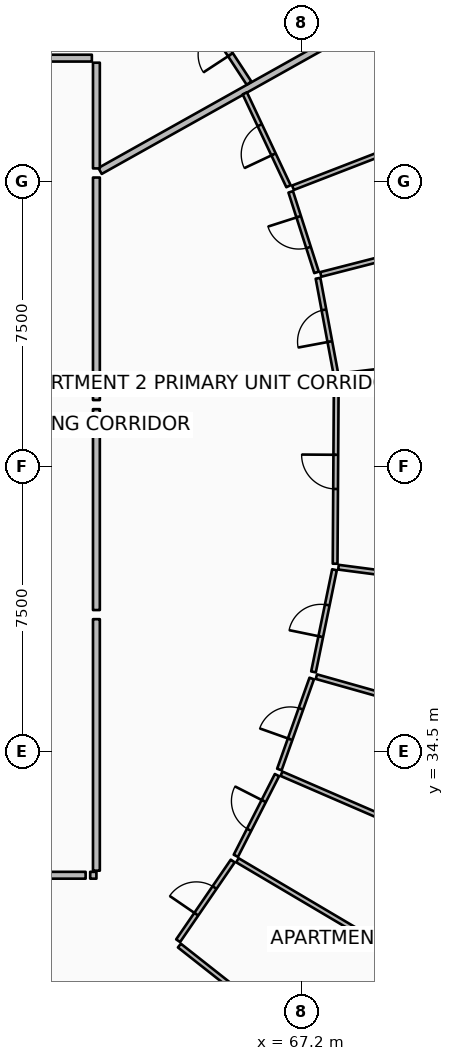
"""IFC4 building model, lengths in metres.
Left out: names, types, materials, properties, quantities, classifications, styles, units other than length and angle.
Written with IfcOpenShell. Run it as: python <this file> out.ifc"""

import sys

from ifc_helpers import new_model, si_unit, direction, frame, frame_2d, origin, place, context, subcontext, project, spatial, rectangle, extrude, element, fill, save


model = new_model("IFC4")
c1 = context("Model", 3, precision=1e-05, world=origin(), true_north=direction((0.0, 1.0)))
c2 = subcontext(c1, "Body", "Model", "MODEL_VIEW")
j1 = project(units=[si_unit("LENGTHUNIT", "METRE"), si_unit("PLANEANGLEUNIT", "RADIAN")], contexts=[c1])
p1 = place(None, origin())
s1 = spatial("IfcSite", under=j1, at=p1, CompositionType="ELEMENT")
p2 = place(p1, origin())
s2 = spatial("IfcBuilding", under=s1, at=p2, CompositionType="ELEMENT")
p3 = place(p2, frame((0.0, 0.0, 30.15)))
s3 = spatial("IfcBuildingStorey", under=s2, at=p3, CompositionType="ELEMENT", Elevation=30.15)
p4 = place(p3, frame((61.896, 49.782, 0.0), z_axis=(0.0, 0.0, 1.0), x_axis=(0.872493215695, 0.488626225828, 0.0)))
e1 = element("IfcWall", 1, at=p4, inside=s3, PredefinedType="PARTITIONING", context=c2, shape_type="SweptSolid", body=[
    extrude(rectangle(XDim=15.612, YDim=0.18, at=frame_2d((7.806, 0.0))), origin(), (0.0, 0.0, 1.0), 2.867),
])
p5 = place(p3, frame((61.8, 49.848, 0.0), z_axis=(0.0, 0.0, 1.0), x_axis=(0.0, 1.0, 0.0)))
e2 = element("IfcWall", 2, at=p5, inside=s3, PredefinedType="PARTITIONING", context=c2, shape_type="SweptSolid", body=[
    extrude(rectangle(XDim=2.781, YDim=0.18, at=frame_2d((1.391, 0.0))), origin(), (0.0, 0.0, 1.0), 2.867),
])
p6 = place(p3, frame((61.68, 52.75, 0.0), z_axis=(0.0, 0.0, 1.0), x_axis=(-1.0, 0.0, 0.0)))
e3 = element("IfcWall", 3, at=p6, inside=s3, PredefinedType="PARTITIONING", context=c2, shape_type="SweptSolid", body=[
    extrude(rectangle(XDim=5.085, YDim=0.18, at=frame_2d((2.543, 0.0))), origin(), (0.0, 0.0, 1.0), 2.867),
])
p7 = place(p3, frame((65.816, 52.092, 0.0), z_axis=(0.0, 0.0, 1.0), x_axis=(-0.547635625156, 0.836716930664, 0.0)))
e4 = element("IfcWall", 4, at=p7, inside=s3, PredefinedType="PARTITIONING", context=c2, shape_type="SweptSolid", body=[
    extrude(rectangle(XDim=2.639, YDim=0.15, at=frame_2d((1.32, 0.0))), origin(), (0.0, 0.0, 1.0), 2.867),
])
p8 = place(p7, frame((0.895, 0.0, 0.0)))
e5 = element("IfcOpeningElement", 5, at=p8, cuts=e4, PredefinedType="OPENING", context=c2, shape_type="SweptSolid", body=[
    extrude(rectangle(XDim=0.85, YDim=2.06, at=frame_2d((0.425, 1.03))), frame((0.0, 0.085, 0.0), z_axis=(0.0, -1.0, 0.0), x_axis=(1.0, 0.0, 0.0)), (0.0, 0.0, 1.0), 0.17),
])
p9 = place(p3, frame((54.14, 31.25, 0.0), z_axis=(0.0, 0.0, 1.0), x_axis=(1.0, 0.0, 0.0)))
e6 = element("IfcWall", 6, at=p9, inside=s3, PredefinedType="PARTITIONING", context=c2, shape_type="SweptSolid", body=[
    extrude(rectangle(XDim=7.376, YDim=0.18, at=frame_2d((3.688, 0.0))), origin(), (0.0, 0.0, 1.0), 2.867),
])
p10 = place(p9, frame((3.138, 0.0, 0.0)))
e7 = element("IfcOpeningElement", 7, at=p10, cuts=e6, PredefinedType="OPENING", context=c2, shape_type="SweptSolid", body=[
    extrude(rectangle(XDim=1.1, YDim=2.1, at=frame_2d((0.55, 1.05))), frame((0.0, 0.1, 0.0), z_axis=(0.0, -1.0, 0.0), x_axis=(1.0, 0.0, 0.0)), (0.0, 0.0, 1.0), 0.2),
])
p11 = place(p3, frame((61.636, 31.25, 0.0), z_axis=(0.0, 0.0, 1.0), x_axis=(1.0, 0.0, 0.0)))
e8 = element("IfcWall", 8, at=p11, inside=s3, PredefinedType="PARTITIONING", context=c2, shape_type="SweptSolid", body=[
    extrude(rectangle(XDim=0.164, YDim=0.18, at=frame_2d((0.082, 0.0))), origin(), (0.0, 0.0, 1.0), 2.867),
])
p12 = place(p3, frame((61.8, 31.37, 0.0), z_axis=(0.0, 0.0, 1.0), x_axis=(0.0, 1.0, 0.0)))
e9 = element("IfcWall", 9, at=p12, inside=s3, PredefinedType="PARTITIONING", context=c2, shape_type="SweptSolid", body=[
    extrude(rectangle(XDim=6.618, YDim=0.18, at=frame_2d((3.309, 0.0))), origin(), (0.0, 0.0, 1.0), 2.867),
])
p13 = place(p3, frame((63.983, 29.4, 0.0), z_axis=(0.0, 0.0, 1.0), x_axis=(0.785322984339, -0.619086270457, 0.0)))
e10 = element("IfcWall", 10, at=p13, inside=s3, PredefinedType="PARTITIONING", context=c2, shape_type="SweptSolid", body=[
    extrude(rectangle(XDim=7.719, YDim=0.125, at=frame_2d((3.86, 0.0))), origin(), (0.0, 0.0, 1.0), 2.867),
])
p14 = place(p3, frame((65.51, 31.645, 0.0), z_axis=(0.0, 0.0, 1.0), x_axis=(0.86074163886, -0.509042072065, 0.0)))
e11 = element("IfcWall", 11, at=p14, inside=s3, PredefinedType="PARTITIONING", context=c2, shape_type="SweptSolid", body=[
    extrude(rectangle(XDim=7.968, YDim=0.125, at=frame_2d((3.984, 0.0))), origin(), (0.0, 0.0, 1.0), 2.94),
])
p15 = place(p3, frame((66.67, 33.921, 0.0), z_axis=(0.0, 0.0, 1.0), x_axis=(0.917747697885, -0.397163899451, 0.0)))
e12 = element("IfcWall", 12, at=p15, inside=s3, PredefinedType="PARTITIONING", context=c2, shape_type="SweptSolid", body=[
    extrude(rectangle(XDim=8.775, YDim=0.125, at=frame_2d((4.387, 0.0))), origin(), (0.0, 0.0, 1.0), 2.94),
])
p16 = place(p3, frame((63.95, 29.528, 0.0), z_axis=(0.0, 0.0, 1.0), x_axis=(0.565358509176, 0.824845292223, 0.0)))
e13 = element("IfcWall", 13, at=p16, inside=s3, PredefinedType="PARTITIONING", context=c2, shape_type="SweptSolid", body=[
    extrude(rectangle(XDim=2.542, YDim=0.125, at=frame_2d((1.271, 0.0))), origin(), (0.0, 0.0, 1.0), 2.867),
])
p17 = place(p16, frame((0.846, 0.0, 0.0)))
e14 = element("IfcOpeningElement", 14, at=p17, cuts=e13, PredefinedType="OPENING", context=c2, shape_type="SweptSolid", body=[
    extrude(rectangle(XDim=0.85, YDim=2.06, at=frame_2d((0.425, 1.03))), frame((0.0, 0.073, 0.0), z_axis=(0.0, -1.0, 0.0), x_axis=(1.0, 0.0, 0.0)), (0.0, 0.0, 1.0), 0.145),
])
p18 = place(p3, frame((65.469, 31.762, 0.0), z_axis=(0.0, 0.0, 1.0), x_axis=(0.45400250644, 0.891000406367, 0.0)))
e15 = element("IfcWall", 15, at=p18, inside=s3, PredefinedType="PARTITIONING", context=c2, shape_type="SweptSolid", body=[
    extrude(rectangle(XDim=2.383, YDim=0.125, at=frame_2d((1.192, 0.0))), origin(), (0.0, 0.0, 1.0), 2.94),
])
p19 = place(p18, frame((0.767, 0.0, 0.0)))
e16 = element("IfcOpeningElement", 16, at=p19, cuts=e15, PredefinedType="OPENING", context=c2, shape_type="SweptSolid", body=[
    extrude(rectangle(XDim=0.85, YDim=2.06, at=frame_2d((0.425, 1.03))), frame((0.0, 0.073, 0.0), z_axis=(0.0, -1.0, 0.0), x_axis=(1.0, 0.0, 0.0)), (0.0, 0.0, 1.0), 0.145),
])
p20 = place(p3, frame((66.614, 34.032, 0.0), z_axis=(0.0, 0.0, 1.0), x_axis=(0.335094930465, 0.942184370268, 0.0)))
e17 = element("IfcWall", 17, at=p20, inside=s3, PredefinedType="PARTITIONING", context=c2, shape_type="SweptSolid", body=[
    extrude(rectangle(XDim=2.542, YDim=0.125, at=frame_2d((1.271, 0.0))), origin(), (0.0, 0.0, 1.0), 2.867),
])
p21 = place(p20, frame((0.846, 0.0, 0.0)))
e18 = element("IfcOpeningElement", 18, at=p21, cuts=e17, PredefinedType="OPENING", context=c2, shape_type="SweptSolid", body=[
    extrude(rectangle(XDim=0.85, YDim=2.06, at=frame_2d((0.425, 1.03))), frame((0.0, 0.073, 0.0), z_axis=(0.0, -1.0, 0.0), x_axis=(1.0, 0.0, 0.0)), (0.0, 0.0, 1.0), 0.145),
])
p22 = place(p3, frame((61.8, 38.228, 0.0), z_axis=(0.0, 0.0, 1.0), x_axis=(0.0, 1.0, 0.0)))
e19 = element("IfcWall", 19, at=p22, inside=s3, PredefinedType="PARTITIONING", context=c2, shape_type="SweptSolid", body=[
    extrude(rectangle(XDim=5.285, YDim=0.18, at=frame_2d((2.643, 0.0))), origin(), (0.0, 0.0, 1.0), 2.867),
])
p23 = place(p3, frame((67.589, 36.475, 0.0), z_axis=(0.0, 0.0, 1.0), x_axis=(0.962457516126, -0.271432366627, 0.0)))
e20 = element("IfcWall", 20, at=p23, inside=s3, PredefinedType="PARTITIONING", context=c2, shape_type="SweptSolid", body=[
    extrude(rectangle(XDim=10.221, YDim=0.125, at=frame_2d((5.111, 0.0))), origin(), (0.0, 0.0, 1.0), 2.867),
])
p24 = place(p3, frame((68.17, 39.355, 0.0), z_axis=(0.0, 0.0, 1.0), x_axis=(0.991512615626, -0.130010511326, 0.0)))
e21 = element("IfcWall", 21, at=p24, inside=s3, PredefinedType="PARTITIONING", context=c2, shape_type="SweptSolid", body=[
    extrude(rectangle(XDim=10.369, YDim=0.125, at=frame_2d((5.185, 0.0))), origin(), (0.0, 0.0, 1.0), 2.94),
])
p25 = place(p3, frame((67.513, 36.601, 0.0), z_axis=(0.0, 0.0, 1.0), x_axis=(0.201246233374, 0.979540684991, 0.0)))
e22 = element("IfcWall", 22, at=p25, inside=s3, PredefinedType="PARTITIONING", context=c2, shape_type="SweptSolid", body=[
    extrude(rectangle(XDim=2.744, YDim=0.125, at=frame_2d((1.372, 0.0))), origin(), (0.0, 0.0, 1.0), 2.867),
])
p26 = place(p25, frame((0.947, 0.0, 0.0)))
e23 = element("IfcOpeningElement", 23, at=p26, cuts=e22, PredefinedType="OPENING", context=c2, shape_type="SweptSolid", body=[
    extrude(rectangle(XDim=0.85, YDim=2.06, at=frame_2d((0.425, 1.03))), frame((0.0, 0.073, 0.0), z_axis=(0.0, -1.0, 0.0), x_axis=(1.0, 0.0, 0.0)), (0.0, 0.0, 1.0), 0.145),
])
p27 = place(p3, frame((68.082, 39.447, 0.0), z_axis=(0.0, 0.0, 1.0), x_axis=(0.006313643226, 0.999980068756, 0.0)))
e24 = element("IfcWall", 24, at=p27, inside=s3, PredefinedType="PARTITIONING", context=c2, shape_type="SweptSolid", body=[
    extrude(rectangle(XDim=4.833, YDim=0.125, at=frame_2d((2.417, 0.0))), origin(), (0.0, 0.0, 1.0), 2.867),
])
p28 = place(p27, frame((1.967, 0.0, 0.0)))
e25 = element("IfcOpeningElement", 25, at=p28, cuts=e24, PredefinedType="OPENING", context=c2, shape_type="SweptSolid", body=[
    extrude(rectangle(XDim=0.9, YDim=2.08, at=frame_2d((0.45, 1.04))), frame((0.0, 0.073, 0.0), z_axis=(0.0, -1.0, 0.0), x_axis=(1.0, 0.0, 0.0)), (0.0, 0.0, 1.0), 0.145),
])
p29 = place(p3, frame((61.8, 43.753, 0.0), z_axis=(0.0, 0.0, 1.0), x_axis=(0.0, 1.0, 0.0)))
e26 = element("IfcWall", 26, at=p29, inside=s3, PredefinedType="PARTITIONING", context=c2, shape_type="SweptSolid", body=[
    extrude(rectangle(XDim=5.855, YDim=0.18, at=frame_2d((2.927, 0.0))), origin(), (0.0, 0.0, 1.0), 2.867),
])
p30 = place(p3, frame((68.212, 44.392, 0.0), z_axis=(0.0, 0.0, 1.0), x_axis=(0.993068868454, 0.117533920671, 0.0)))
e27 = element("IfcWall", 27, at=p30, inside=s3, PredefinedType="PARTITIONING", context=c2, shape_type="SweptSolid", body=[
    extrude(rectangle(XDim=11.186, YDim=0.125, at=frame_2d((5.593, 0.0))), origin(), (0.0, 0.0, 1.0), 2.867),
])
p31 = place(p3, frame((67.704, 47.059, 0.0), z_axis=(0.0, 0.0, 1.0), x_axis=(0.968581650893, 0.248695769071, 0.0)))
e28 = element("IfcWall", 28, at=p31, inside=s3, PredefinedType="PARTITIONING", context=c2, shape_type="SweptSolid", body=[
    extrude(rectangle(XDim=10.65, YDim=0.125, at=frame_2d((5.325, 0.0))), origin(), (0.0, 0.0, 1.0), 2.94),
])
p32 = place(p3, frame((66.973, 49.34, 0.0), z_axis=(0.0, 0.0, 1.0), x_axis=(0.93264336061, 0.360799614621, 0.0)))
e29 = element("IfcWall", 29, at=p32, inside=s3, PredefinedType="PARTITIONING", context=c2, shape_type="SweptSolid", body=[
    extrude(rectangle(XDim=10.636, YDim=0.125, at=frame_2d((5.318, 0.0))), origin(), (0.0, 0.0, 1.0), 2.94),
])
p33 = place(p3, frame((68.098, 44.459, 0.0), z_axis=(0.0, 0.0, 1.0), x_axis=(-0.183523097457, 0.983015397997, 0.0)))
e30 = element("IfcWall", 30, at=p33, inside=s3, PredefinedType="PARTITIONING", context=c2, shape_type="SweptSolid", body=[
    extrude(rectangle(XDim=2.542, YDim=0.125, at=frame_2d((1.271, 0.0))), origin(), (0.0, 0.0, 1.0), 2.867),
])
p34 = place(p33, frame((0.846, 0.0, 0.0)))
e31 = element("IfcOpeningElement", 31, at=p34, cuts=e30, PredefinedType="OPENING", context=c2, shape_type="SweptSolid", body=[
    extrude(rectangle(XDim=0.85, YDim=2.06, at=frame_2d((0.425, 1.03))), frame((0.0, 0.073, 0.0), z_axis=(0.0, -1.0, 0.0), x_axis=(1.0, 0.0, 0.0)), (0.0, 0.0, 1.0), 0.145),
])
p35 = place(p3, frame((67.592, 47.113, 0.0), z_axis=(0.0, 0.0, 1.0), x_axis=(-0.305309270218, 0.952253248626, 0.0)))
e32 = element("IfcWall", 32, at=p35, inside=s3, PredefinedType="PARTITIONING", context=c2, shape_type="SweptSolid", body=[
    extrude(rectangle(XDim=2.225, YDim=0.125, at=frame_2d((1.112, 0.0))), origin(), (0.0, 0.0, 1.0), 2.94),
])
p36 = place(p35, frame((0.687, 0.0, 0.0)))
e33 = element("IfcOpeningElement", 33, at=p36, cuts=e32, PredefinedType="OPENING", context=c2, shape_type="SweptSolid", body=[
    extrude(rectangle(XDim=0.85, YDim=2.06, at=frame_2d((0.425, 1.03))), frame((0.0, 0.073, 0.0), z_axis=(0.0, -1.0, 0.0), x_axis=(1.0, 0.0, 0.0)), (0.0, 0.0, 1.0), 0.145),
])
p37 = place(p3, frame((66.854, 49.38, 0.0), z_axis=(0.0, 0.0, 1.0), x_axis=(-0.425714313245, 0.904857626093, 0.0)))
e34 = element("IfcWall", 34, at=p37, inside=s3, PredefinedType="PARTITIONING", context=c2, shape_type="SweptSolid", body=[
    extrude(rectangle(XDim=2.7, YDim=0.125, at=frame_2d((1.35, 0.0))), origin(), (0.0, 0.0, 1.0), 2.867),
])
p38 = place(p37, frame((0.925, 0.0, 0.0)))
e35 = element("IfcOpeningElement", 35, at=p38, cuts=e34, PredefinedType="OPENING", context=c2, shape_type="SweptSolid", body=[
    extrude(rectangle(XDim=0.85, YDim=2.06, at=frame_2d((0.425, 1.03))), frame((0.0, 0.073, 0.0), z_axis=(0.0, -1.0, 0.0), x_axis=(1.0, 0.0, 0.0)), (0.0, 0.0, 1.0), 0.145),
])
p39 = place(p8, origin())
e36 = element("IfcDoor", 36, at=p39, inside=s3, OperationType="SINGLE_SWING_LEFT", PredefinedType="DOOR", context=c2, shape_type="SweptSolid", body=[
    extrude(rectangle(XDim=0.85, YDim=2.06, at=frame_2d((0.425, 1.03))), frame((0.0, 0.025, 0.0), z_axis=(0.0, -1.0, 0.0), x_axis=(1.0, 0.0, 0.0)), (0.0, 0.0, 1.0), 0.05),
])
fill(e5, e36)
p40 = place(p17, origin())
e37 = element("IfcDoor", 37, at=p40, inside=s3, OperationType="SINGLE_SWING_LEFT", PredefinedType="DOOR", context=c2, shape_type="SweptSolid", body=[
    extrude(rectangle(XDim=0.85, YDim=2.06, at=frame_2d((0.425, 1.03))), frame((0.0, 0.025, 0.0), z_axis=(0.0, -1.0, 0.0), x_axis=(1.0, 0.0, 0.0)), (0.0, 0.0, 1.0), 0.05),
])
fill(e14, e37)
p41 = place(p19, origin())
e38 = element("IfcDoor", 38, at=p41, inside=s3, OperationType="SINGLE_SWING_RIGHT", PredefinedType="DOOR", context=c2, shape_type="SweptSolid", body=[
    extrude(rectangle(XDim=0.85, YDim=2.06, at=frame_2d((0.425, 1.03))), frame((0.0, 0.025, 0.0), z_axis=(0.0, -1.0, 0.0), x_axis=(1.0, 0.0, 0.0)), (0.0, 0.0, 1.0), 0.05),
])
fill(e16, e38)
p42 = place(p21, origin())
e39 = element("IfcDoor", 39, at=p42, inside=s3, OperationType="SINGLE_SWING_LEFT", PredefinedType="DOOR", context=c2, shape_type="SweptSolid", body=[
    extrude(rectangle(XDim=0.85, YDim=2.06, at=frame_2d((0.425, 1.03))), frame((0.0, 0.025, 0.0), z_axis=(0.0, -1.0, 0.0), x_axis=(1.0, 0.0, 0.0)), (0.0, 0.0, 1.0), 0.05),
])
fill(e18, e39)
p43 = place(p26, origin())
e40 = element("IfcDoor", 40, at=p43, inside=s3, OperationType="SINGLE_SWING_LEFT", PredefinedType="DOOR", context=c2, shape_type="SweptSolid", body=[
    extrude(rectangle(XDim=0.85, YDim=2.06, at=frame_2d((0.425, 1.03))), frame((0.0, 0.025, 0.0), z_axis=(0.0, -1.0, 0.0), x_axis=(1.0, 0.0, 0.0)), (0.0, 0.0, 1.0), 0.05),
])
fill(e23, e40)
p44 = place(p28, origin())
e41 = element("IfcDoor", 41, at=p44, inside=s3, OperationType="SINGLE_SWING_RIGHT", PredefinedType="DOOR", context=c2, shape_type="SweptSolid", body=[
    extrude(rectangle(XDim=0.9, YDim=2.08, at=frame_2d((0.45, 1.04))), frame((0.0, 0.025, 0.0), z_axis=(0.0, -1.0, 0.0), x_axis=(1.0, 0.0, 0.0)), (0.0, 0.0, 1.0), 0.05),
])
fill(e25, e41)
p45 = place(p34, origin())
e42 = element("IfcDoor", 42, at=p45, inside=s3, OperationType="SINGLE_SWING_LEFT", PredefinedType="DOOR", context=c2, shape_type="SweptSolid", body=[
    extrude(rectangle(XDim=0.85, YDim=2.06, at=frame_2d((0.425, 1.03))), frame((0.0, 0.025, 0.0), z_axis=(0.0, -1.0, 0.0), x_axis=(1.0, 0.0, 0.0)), (0.0, 0.0, 1.0), 0.05),
])
fill(e31, e42)
p46 = place(p36, origin())
e43 = element("IfcDoor", 43, at=p46, inside=s3, OperationType="SINGLE_SWING_RIGHT", PredefinedType="DOOR", context=c2, shape_type="SweptSolid", body=[
    extrude(rectangle(XDim=0.85, YDim=2.06, at=frame_2d((0.425, 1.03))), frame((0.0, 0.025, 0.0), z_axis=(0.0, -1.0, 0.0), x_axis=(1.0, 0.0, 0.0)), (0.0, 0.0, 1.0), 0.05),
])
fill(e33, e43)
p47 = place(p38, origin())
e44 = element("IfcDoor", 44, at=p47, inside=s3, OperationType="SINGLE_SWING_LEFT", PredefinedType="DOOR", context=c2, shape_type="SweptSolid", body=[
    extrude(rectangle(XDim=0.85, YDim=2.06, at=frame_2d((0.425, 1.03))), frame((0.0, 0.025, 0.0), z_axis=(0.0, -1.0, 0.0), x_axis=(1.0, 0.0, 0.0)), (0.0, 0.0, 1.0), 0.05),
])
fill(e35, e44)
save(model, sys.argv[1])
